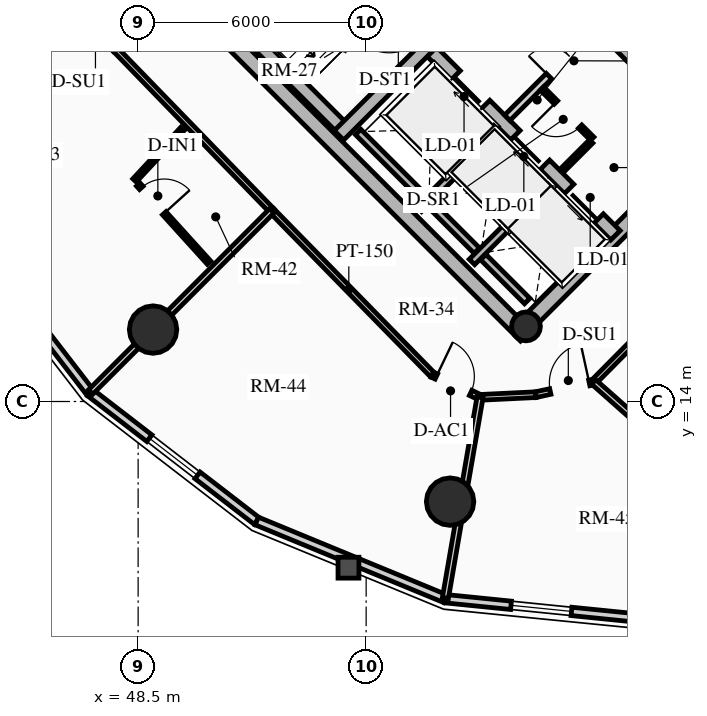
"""IFC4 building model, lengths in metres.
Left out: names, types, materials, properties, quantities, classifications, styles, units other than length and angle.
Written with IfcOpenShell. Run it as: python <this file> out.ifc"""

import sys

from ifc_helpers import new_model, si_unit, direction, frame, frame_2d, origin, origin_2d, place, context, subcontext, project, spatial, rectangle, circle, hollow_circle, extrude, source, transform, mapped, element, fill, save


model = new_model("IFC4")
c1 = context("Model", 3, precision=1e-05, world=origin(), true_north=direction((0.0, 1.0)))
c2 = subcontext(c1, "Body", "Model", "MODEL_VIEW")
j1 = project(units=[si_unit("LENGTHUNIT", "METRE"), si_unit("PLANEANGLEUNIT", "RADIAN")], contexts=[c1])
p1 = place(None, origin())
s1 = spatial("IfcSite", under=j1, at=p1, CompositionType="ELEMENT")
p2 = place(p1, origin())
s2 = spatial("IfcBuilding", under=s1, at=p2, CompositionType="ELEMENT")
p3 = place(p2, frame((0.0, 0.0, 154.51)))
s3 = spatial("IfcBuildingStorey", under=s2, at=p3, CompositionType="ELEMENT", Elevation=154.51)
for number, where, z_axis, x_axis in (
    (1, (58.702, 15.732, 0.0), (0.0, 0.0, 1.0), (-0.707, 0.707, 0.0)),
    (2, (66.268, 23.298, 0.0), (0.0, 0.0, 1.0), (-0.707, 0.707, 0.0)),
):
    element("IfcWall", number, at=place(p3, frame(where, z_axis=z_axis, x_axis=x_axis)), inside=s3, PredefinedType="SHEAR", context=c2, shape_type="SweptSolid", body=[
        extrude(rectangle(XDim=14.1, YDim=0.4, at=frame_2d((7.05, 0.0))), origin(), (0.0, 0.0, 1.0), 2.91),
    ])
p4 = place(p3, frame((58.561, 15.873, 0.0), z_axis=(0.0, 0.0, 1.0), x_axis=(0.707106781187, 0.707106781187, 0.0)))
e3 = element("IfcWall", 3, at=p4, inside=s3, PredefinedType="SHEAR", context=c2, shape_type="SweptSolid", body=[
    extrude(rectangle(XDim=10.7, YDim=0.4, at=frame_2d((5.35, 0.0))), origin(), (0.0, 0.0, 1.0), 2.91),
])
m1 = source(origin(), c2, "Body", "SweptSolid", [
    extrude(rectangle(XDim=1.5, YDim=2.02, at=frame_2d((0.75, 1.01))), frame((0.0, 0.21, 0.0), z_axis=(0.0, -1.0, 0.0), x_axis=(1.0, 0.0, 0.0)), (0.0, 0.0, 1.0), 0.42),
])
p5 = place(p4, frame((5.45, 0.0, 0.0)))
e4 = element("IfcOpeningElement", 4, at=p5, cuts=e3, PredefinedType="OPENING", context=c2, shape_type="MappedRepresentation", body=[
    mapped(m1, transform((0.0, 0.0, 0.0), x_axis=(1.0, 0.0, 0.0), y_axis=(0.0, 1.0, 0.0), z_axis=(0.0, 0.0, 1.0), scale=1.0)),
])
p6 = place(p3, frame((61.06, 18.373, 0.0), z_axis=(0.0, 0.0, 1.0), x_axis=(-0.707106781187, 0.707106781187, 0.0)))
e5 = element("IfcWall", 5, at=p6, inside=s3, PredefinedType="SHEAR", context=c2, shape_type="SweptSolid", body=[
    extrude(rectangle(XDim=13.7, YDim=0.35, at=frame_2d((6.85, 0.0))), origin(), (0.0, 0.0, 1.0), 2.91),
])
m2 = source(origin(), c2, "Body", "SweptSolid", [
    extrude(rectangle(XDim=1.1, YDim=2.015, at=frame_2d((0.55, 1.007))), frame((0.0, 0.185, 0.0), z_axis=(0.0, -1.0, 0.0), x_axis=(1.0, 0.0, 0.0)), (0.0, 0.0, 1.0), 0.37),
])
p7 = place(p6, frame((4.85, 0.0, 0.0)))
e6 = element("IfcOpeningElement", 6, at=p7, cuts=e5, PredefinedType="OPENING", context=c2, shape_type="MappedRepresentation", body=[
    mapped(m2, transform((0.0, 0.0, 0.0), x_axis=(1.0, 0.0, 0.0), y_axis=(0.0, 1.0, 0.0), z_axis=(0.0, 0.0, 1.0), scale=1.0)),
])
p8 = place(p6, frame((0.625, 0.0, 0.0)))
e7 = element("IfcOpeningElement", 7, at=p8, cuts=e5, PredefinedType="OPENING", context=c2, shape_type="MappedRepresentation", body=[
    mapped(m2, transform((0.0, 0.0, 0.0), x_axis=(1.0, 0.0, 0.0), y_axis=(0.0, 1.0, 0.0), z_axis=(0.0, 0.0, 1.0), scale=1.0)),
])
p9 = place(p6, frame((2.625, 0.0, 0.0)))
e8 = element("IfcOpeningElement", 8, at=p9, cuts=e5, PredefinedType="OPENING", context=c2, shape_type="MappedRepresentation", body=[
    mapped(m2, transform((0.0, 0.0, 0.0), x_axis=(1.0, 0.0, 0.0), y_axis=(0.0, 1.0, 0.0), z_axis=(0.0, 0.0, 1.0), scale=1.0)),
])
m3 = source(origin(), c2, "Body", "SweptSolid", [
    extrude(rectangle(XDim=1.15, YDim=2.02, at=frame_2d((0.575, 1.01))), frame((0.0, 0.185, 0.0), z_axis=(0.0, -1.0, 0.0), x_axis=(1.0, 0.0, 0.0)), (0.0, 0.0, 1.0), 0.37),
])
p10 = place(p6, frame((7.27, 0.0, 0.0)))
e9 = element("IfcOpeningElement", 9, at=p10, cuts=e5, PredefinedType="OPENING", context=c2, shape_type="MappedRepresentation", body=[
    mapped(m3, transform((0.0, 0.0, 0.0), x_axis=(1.0, 0.0, 0.0), y_axis=(0.0, 1.0, 0.0), z_axis=(0.0, 0.0, 1.0), scale=1.0)),
])
p11 = place(p3, frame((63.627, 20.94, 0.0), z_axis=(0.0, 0.0, 1.0), x_axis=(-0.707119496762, 0.707094065383, 0.0)))
e10 = element("IfcWall", 10, at=p11, inside=s3, PredefinedType="SHEAR", context=c2, shape_type="SweptSolid", body=[
    extrude(rectangle(XDim=9.6, YDim=0.35, at=frame_2d((4.8, 0.0))), origin(), (0.0, 0.0, 1.0), 2.91),
])
p12 = place(p11, frame((5.28, 0.0, 0.0)))
e11 = element("IfcOpeningElement", 11, at=p12, cuts=e10, PredefinedType="OPENING", context=c2, shape_type="MappedRepresentation", body=[
    mapped(m3, transform((0.0, 0.0, 0.0), x_axis=(1.0, 0.0, 0.0), y_axis=(0.0, 1.0, 0.0), z_axis=(0.0, 0.0, 1.0), scale=1.0)),
])
p13 = place(p3, frame((53.922, 21.141, 0.0), z_axis=(0.0, 0.0, 1.0), x_axis=(-0.707106781187, 0.707106781187, 0.0)))
e12 = element("IfcWall", 12, at=p13, inside=s3, PredefinedType="SHEAR", context=c2, shape_type="SweptSolid", body=[
    extrude(rectangle(XDim=6.695, YDim=0.35, at=frame_2d((3.348, 0.0))), origin(), (0.0, 0.0, 1.0), 2.91),
])
p14 = place(p3, frame((53.784, 21.003, 0.0), z_axis=(0.0, 0.0, 1.0), x_axis=(0.707106781187, 0.707106781187, 0.0)))
e13 = element("IfcWall", 13, at=p14, inside=s3, PredefinedType="SHEAR", context=c2, shape_type="SweptSolid", body=[
    extrude(rectangle(XDim=3.285, YDim=0.35, at=frame_2d((1.643, 0.0))), origin(), (0.0, 0.0, 1.0), 2.91),
])
p15 = place(p3, frame((65.812, 23.125, 0.0), z_axis=(0.0, 0.0, 1.0), x_axis=(-0.707106781187, 0.707106781187, 0.0)))
e14 = element("IfcWall", 14, at=p15, inside=s3, PredefinedType="SHEAR", context=c2, shape_type="SweptSolid", body=[
    extrude(rectangle(XDim=6.695, YDim=0.35, at=frame_2d((3.348, 0.0))), origin(), (0.0, 0.0, 1.0), 2.91),
])
p16 = place(p3, frame((58.706, 15.976, 0.0), z_axis=(0.0, 0.0, 1.0), x_axis=(0.707106781187, 0.707106781187, 0.0)))
e15 = element("IfcColumn", 15, at=p16, inside=s3, PredefinedType="COLUMN", context=c2, shape_type="SweptSolid", body=[
    extrude(hollow_circle(Radius=0.38, WallThickness=0.032, at=origin_2d()), origin(), (0.0, 0.0, 1.0), 2.91),
])
for number, where, z_axis, x_axis in (
    (16, (48.893, 15.893, 0.0), (0.0, 0.0, 1.0), (1.0, 0.0, 0.0)),
    (17, (56.709, 11.365, 0.0), (0.0, 0.0, 1.0), (1.0, 0.0, 0.0)),
):
    element("IfcColumn", number, at=place(p3, frame(where, z_axis=z_axis, x_axis=x_axis)), inside=s3, PredefinedType="USERDEFINED", context=c2, shape_type="SweptSolid", body=[
        extrude(circle(Radius=0.625, at=origin_2d()), origin(), (0.0, 0.0, 1.0), 2.91),
    ])
p17 = place(p3, frame((47.236, 14.236, 0.0), z_axis=(0.0, 0.0, 1.0), x_axis=(-0.610543584779, 0.791982658323, 0.0)))
e18 = element("IfcWall", 18, at=p17, inside=s3, PredefinedType="SOLIDWALL", context=c2, shape_type="SweptSolid", body=[
    extrude(rectangle(XDim=5.537, YDim=0.22, at=frame_2d((2.769, 0.0))), origin(), (0.0, 0.0, 1.0), 2.245),
])
p18 = place(p3, frame((51.622, 10.856, 0.0), z_axis=(0.0, 0.0, 1.0), x_axis=(-0.791982658323, 0.610543584779, 0.0)))
e19 = element("IfcWall", 19, at=p18, inside=s3, PredefinedType="SOLIDWALL", context=c2, shape_type="SweptSolid", body=[
    extrude(rectangle(XDim=5.537, YDim=0.22, at=frame_2d((2.769, 0.0))), origin(), (0.0, 0.0, 1.0), 2.245),
])
m4 = source(origin(), c2, "Body", "SweptSolid", [
    extrude(rectangle(XDim=1.6, YDim=1.3, at=frame_2d((0.8, 0.65))), frame((0.0, 0.12, 0.0), z_axis=(0.0, -1.0, 0.0), x_axis=(1.0, 0.0, 0.0)), (0.0, 0.0, 1.0), 0.24),
])
p19 = place(p18, frame((1.968, 0.0, 0.65)))
e20 = element("IfcOpeningElement", 20, at=p19, cuts=e19, PredefinedType="OPENING", context=c2, shape_type="MappedRepresentation", body=[
    mapped(m4, transform((0.0, 0.0, 0.0), x_axis=(1.0, 0.0, 0.0), y_axis=(0.0, 1.0, 0.0), z_axis=(0.0, 0.0, 1.0), scale=1.0)),
])
p20 = place(p3, frame((56.582, 8.811, 0.0), z_axis=(0.0, 0.0, 1.0), x_axis=(-0.924528197738, 0.38111364655, 0.0)))
e21 = element("IfcWall", 21, at=p20, inside=s3, PredefinedType="SOLIDWALL", context=c2, shape_type="SweptSolid", body=[
    extrude(rectangle(XDim=5.366, YDim=0.22, at=frame_2d((2.683, 0.0))), origin(), (0.0, 0.0, 1.0), 2.245),
])
p21 = place(p3, frame((61.633, 8.302, 0.0), z_axis=(0.0, 0.0, 1.0), x_axis=(-0.994959267396, 0.100279889424, 0.0)))
e22 = element("IfcWall", 22, at=p21, inside=s3, PredefinedType="SOLIDWALL", context=c2, shape_type="SweptSolid", body=[
    extrude(rectangle(XDim=5.076, YDim=0.22, at=frame_2d((2.538, 0.0))), origin(), (0.0, 0.0, 1.0), 2.245),
])
p22 = place(p21, frame((1.738, 0.0, 0.65)))
e23 = element("IfcOpeningElement", 23, at=p22, cuts=e22, PredefinedType="OPENING", context=c2, shape_type="MappedRepresentation", body=[
    mapped(m4, transform((0.0, 0.0, 0.0), x_axis=(1.0, 0.0, 0.0), y_axis=(0.0, 1.0, 0.0), z_axis=(0.0, 0.0, 1.0), scale=1.0)),
])
p23 = place(p3, frame((55.888, 19.069, 0.0), z_axis=(0.0, 0.0, 1.0), x_axis=(0.707106781187, 0.707106781187, 0.0)))
e24 = element("IfcWall", 24, at=p23, inside=s3, PredefinedType="SHEAR", context=c2, shape_type="SweptSolid", body=[
    extrude(rectangle(XDim=2.97, YDim=0.2, at=frame_2d((1.485, 0.0))), origin(), (0.0, 0.0, 1.0), 2.91),
])
p24 = place(p3, frame((56.015, 19.366, 0.0), z_axis=(0.0, 0.0, 1.0), x_axis=(-0.707106781187, 0.707106781187, 0.0)))
e25 = element("IfcWall", 25, at=p24, inside=s3, PredefinedType="SHEAR", context=c2, shape_type="SweptSolid", body=[
    extrude(rectangle(XDim=2.44, YDim=0.2, at=frame_2d((1.22, 0.0))), origin(), (0.0, 0.0, 1.0), 2.91),
])
p25 = place(p3, frame((57.284, 17.673, 0.0), z_axis=(0.0, 0.0, 1.0), x_axis=(0.707147878904, 0.70706568108, 0.0)))
e26 = element("IfcWall", 26, at=p25, inside=s3, PredefinedType="SHEAR", context=c2, shape_type="SweptSolid", body=[
    extrude(rectangle(XDim=2.97, YDim=0.2, at=frame_2d((1.485, 0.0))), origin(), (0.0, 0.0, 1.0), 2.91),
])
p26 = place(p3, frame((57.412, 17.97, 0.0), z_axis=(0.0, 0.0, 1.0), x_axis=(-0.707106781187, 0.707106781187, 0.0)))
e27 = element("IfcWall", 27, at=p26, inside=s3, PredefinedType="SHEAR", context=c2, shape_type="SweptSolid", body=[
    extrude(rectangle(XDim=1.735, YDim=0.2, at=frame_2d((0.867, 0.0))), origin(), (0.0, 0.0, 1.0), 2.91),
])
p27 = place(p3, frame((58.737, 16.644, 0.0), z_axis=(0.0, 0.0, 1.0), x_axis=(-0.707032117043, 0.707181437447, 0.0)))
e28 = element("IfcWall", 28, at=p27, inside=s3, PredefinedType="SHEAR", context=c2, shape_type="SweptSolid", body=[
    extrude(rectangle(XDim=1.635, YDim=0.2, at=frame_2d((0.817, 0.0))), origin(), (0.0, 0.0, 1.0), 2.91),
])
p28 = place(p3, frame((58.214, 21.467, 0.0), z_axis=(0.0, 0.0, 1.0), x_axis=(0.707106781187, 0.707106781187, 0.0)))
e29 = element("IfcWall", 29, at=p28, inside=s3, PredefinedType="PARTITIONING", context=c2, shape_type="SweptSolid", body=[
    extrude(rectangle(XDim=3.28, YDim=0.2, at=frame_2d((1.64, 0.0))), origin(), (0.0, 0.0, 1.0), 2.675),
])
m5 = source(origin(), c2, "Body", "SweptSolid", [
    extrude(rectangle(XDim=1.5, YDim=2.02, at=frame_2d((0.75, 1.01))), frame((0.0, 0.11, 0.0), z_axis=(0.0, -1.0, 0.0), x_axis=(1.0, 0.0, 0.0)), (0.0, 0.0, 1.0), 0.22),
])
p29 = place(p28, frame((1.55, 0.0, 0.0)))
e30 = element("IfcOpeningElement", 30, at=p29, cuts=e29, PredefinedType="OPENING", context=c2, shape_type="MappedRepresentation", body=[
    mapped(m5, transform((0.0, 0.0, 0.0), x_axis=(1.0, 0.0, 0.0), y_axis=(0.0, 1.0, 0.0), z_axis=(0.0, 0.0, 1.0), scale=1.0)),
])
p30 = place(p3, frame((60.448, 20.915, 0.0), z_axis=(0.0, 0.0, 1.0), x_axis=(-0.707106781187, 0.707106781187, 0.0)))
e31 = element("IfcWall", 31, at=p30, inside=s3, PredefinedType="PARTITIONING", context=c2, shape_type="SweptSolid", body=[
    extrude(rectangle(XDim=1.87, YDim=0.125, at=frame_2d((0.935, 0.0))), origin(), (0.0, 0.0, 1.0), 2.675),
])
m6 = source(origin(), c2, "Body", "SweptSolid", [
    extrude(rectangle(XDim=0.9, YDim=2.005, at=frame_2d((0.45, 1.002))), frame((0.0, 0.073, 0.0), z_axis=(0.0, -1.0, 0.0), x_axis=(1.0, 0.0, 0.0)), (0.0, 0.0, 1.0), 0.145),
])
p31 = place(p30, frame((0.45, 0.0, 0.0)))
e32 = element("IfcOpeningElement", 32, at=p31, cuts=e31, PredefinedType="OPENING", context=c2, shape_type="MappedRepresentation", body=[
    mapped(m6, transform((0.0, 0.0, 0.0), x_axis=(1.0, 0.0, 0.0), y_axis=(0.0, 1.0, 0.0), z_axis=(0.0, 0.0, 1.0), scale=1.0)),
])
p32 = place(p3, frame((59.643, 20.066, 0.0), z_axis=(0.0, 0.0, 1.0), x_axis=(0.707106781187, 0.707106781187, 0.0)))
e33 = element("IfcWall", 33, at=p32, inside=s3, PredefinedType="PARTITIONING", context=c2, shape_type="SweptSolid", body=[
    extrude(rectangle(XDim=1.1, YDim=0.125, at=frame_2d((0.55, 0.0))), origin(), (0.0, 0.0, 1.0), 2.675),
])
p33 = place(p3, frame((47.901, 23.265, 0.0), z_axis=(0.0, 0.0, 1.0), x_axis=(0.696355965374, -0.717696572019, 0.0)))
e34 = element("IfcWall", 34, at=p33, inside=s3, PredefinedType="PARTITIONING", context=c2, shape_type="SweptSolid", body=[
    extrude(rectangle(XDim=5.915, YDim=0.15, at=frame_2d((2.957, 0.0))), origin(), (0.0, 0.0, 1.0), 2.675),
])
p34 = place(p3, frame((52.02, 19.02, 0.0), z_axis=(0.0, 0.0, 1.0), x_axis=(0.699456449804, -0.71467522332, 0.0)))
e35 = element("IfcWall", 35, at=p34, inside=s3, PredefinedType="PARTITIONING", context=c2, shape_type="SweptSolid", body=[
    extrude(rectangle(XDim=6.032, YDim=0.15, at=frame_2d((3.016, 0.0))), origin(), (0.0, 0.0, 1.0), 2.245),
])
p35 = place(p3, frame((56.239, 14.709, 0.0), z_axis=(0.0, 0.0, 1.0), x_axis=(0.902374219125, -0.430953325383, 0.0)))
e36 = element("IfcWall", 36, at=p35, inside=s3, PredefinedType="PARTITIONING", context=c2, shape_type="SweptSolid", body=[
    extrude(rectangle(XDim=1.394, YDim=0.15, at=frame_2d((0.697, 0.0))), origin(), (0.0, 0.0, 1.0), 2.245),
])
m7 = source(origin(), c2, "Body", "SweptSolid", [
    extrude(rectangle(XDim=1.0, YDim=2.015, at=frame_2d((0.5, 1.007))), frame((0.0, 0.085, 0.0), z_axis=(0.0, -1.0, 0.0), x_axis=(1.0, 0.0, 0.0)), (0.0, 0.0, 1.0), 0.17),
])
p36 = place(p35, frame((0.12, 0.0, 0.0)))
e37 = element("IfcOpeningElement", 37, at=p36, cuts=e36, PredefinedType="OPENING", context=c2, shape_type="MappedRepresentation", body=[
    mapped(m7, transform((0.0, 0.0, 0.0), x_axis=(1.0, 0.0, 0.0), y_axis=(0.0, 1.0, 0.0), z_axis=(0.0, 0.0, 1.0), scale=1.0)),
])
p37 = place(p3, frame((57.497, 14.109, 0.0), z_axis=(0.0, 0.0, 1.0), x_axis=(0.998828286318, 0.048394777109, 0.0)))
e38 = element("IfcWall", 38, at=p37, inside=s3, PredefinedType="PARTITIONING", context=c2, shape_type="SweptSolid", body=[
    extrude(rectangle(XDim=1.468, YDim=0.15, at=frame_2d((0.734, 0.0))), origin(), (0.0, 0.0, 1.0), 2.245),
])
p38 = place(p3, frame((58.963, 14.18, 0.0), z_axis=(0.0, 0.0, 1.0), x_axis=(0.976826524015, 0.214032572243, 0.0)))
e39 = element("IfcWall", 39, at=p38, inside=s3, PredefinedType="PARTITIONING", context=c2, shape_type="SweptSolid", body=[
    extrude(rectangle(XDim=1.562, YDim=0.15, at=frame_2d((0.781, 0.0))), origin(), (0.0, 0.0, 1.0), 2.245),
])
m8 = source(origin(), c2, "Body", "SweptSolid", [
    extrude(rectangle(XDim=1.05, YDim=2.015, at=frame_2d((0.525, 1.007))), frame((0.0, 0.085, 0.0), z_axis=(0.0, -1.0, 0.0), x_axis=(1.0, 0.0, 0.0)), (0.0, 0.0, 1.0), 0.17),
])
p39 = place(p38, frame((0.392, 0.0, 0.0)))
e40 = element("IfcOpeningElement", 40, at=p39, cuts=e39, PredefinedType="OPENING", context=c2, shape_type="MappedRepresentation", body=[
    mapped(m8, transform((0.0, 0.0, 0.0), x_axis=(1.0, 0.0, 0.0), y_axis=(0.0, 1.0, 0.0), z_axis=(0.0, 0.0, 1.0), scale=1.0)),
])
p40 = place(p3, frame((60.488, 14.514, 0.0), z_axis=(0.0, 0.0, 1.0), x_axis=(0.703880260405, 0.71031864611, 0.0)))
e41 = element("IfcWall", 41, at=p40, inside=s3, PredefinedType="PARTITIONING", context=c2, shape_type="SweptSolid", body=[
    extrude(rectangle(XDim=3.261, YDim=0.15, at=frame_2d((1.63, 0.0))), origin(), (0.0, 0.0, 1.0), 2.245),
])
p41 = place(p3, frame((52.02, 19.02, 0.0), z_axis=(0.0, 0.0, 1.0), x_axis=(-0.707106781187, -0.707106781187, 0.0)))
e42 = element("IfcWall", 42, at=p41, inside=s3, PredefinedType="PARTITIONING", context=c2, shape_type="SweptSolid", body=[
    extrude(rectangle(XDim=6.745, YDim=0.16, at=frame_2d((3.373, 0.0))), origin(), (0.0, 0.0, 1.0), 2.245),
])
p42 = place(p3, frame((57.497, 14.109, 0.0), z_axis=(0.0, 0.0, 1.0), x_axis=(-0.170109923992, -0.985425092922, 0.0)))
e43 = element("IfcWall", 43, at=p42, inside=s3, PredefinedType="PARTITIONING", context=c2, shape_type="SweptSolid", body=[
    extrude(rectangle(XDim=5.356, YDim=0.16, at=frame_2d((2.678, 0.0))), origin(), (0.0, 0.0, 1.0), 2.245),
])
p43 = place(p3, frame((60.488, 14.514, 0.0), z_axis=(0.0, 0.0, 1.0), x_axis=(0.748740614849, -0.662863101761, 0.0)))
e44 = element("IfcWall", 44, at=p43, inside=s3, PredefinedType="PARTITIONING", context=c2, shape_type="SweptSolid", body=[
    extrude(rectangle(XDim=7.721, YDim=0.16, at=frame_2d((3.861, 0.0))), origin(), (0.0, 0.0, 1.0), 2.245),
])
p44 = place(p3, frame((49.665, 21.171, 0.0), z_axis=(0.0, 0.0, 1.0), x_axis=(-0.681089123144, -0.73220052331, 0.0)))
e45 = element("IfcWall", 45, at=p44, inside=s3, PredefinedType="PARTITIONING", context=c2, shape_type="SweptSolid", body=[
    extrude(rectangle(XDim=1.849, YDim=0.125, at=frame_2d((0.924, 0.0))), origin(), (0.0, 0.0, 1.0), 2.675),
])
p45 = place(p3, frame((48.503, 19.711, 0.0), z_axis=(0.0, 0.0, 1.0), x_axis=(0.671201050003, -0.741275354018, 0.0)))
e46 = element("IfcWall", 46, at=p45, inside=s3, PredefinedType="PARTITIONING", context=c2, shape_type="SweptSolid", body=[
    extrude(rectangle(XDim=2.777, YDim=0.125, at=frame_2d((1.388, 0.0))), origin(), (0.0, 0.0, 1.0), 2.675),
])
p46 = place(p45, frame((0.12, 0.0, 0.0)))
e47 = element("IfcOpeningElement", 47, at=p46, cuts=e46, PredefinedType="OPENING", context=c2, shape_type="MappedRepresentation", body=[
    mapped(m6, transform((0.0, 0.0, 0.0), x_axis=(1.0, 0.0, 0.0), y_axis=(0.0, 1.0, 0.0), z_axis=(0.0, 0.0, 1.0), scale=1.0)),
])
m9 = source(origin(), c2, "Body", "SweptSolid", [
    extrude(rectangle(XDim=1.6, YDim=1.3, at=frame_2d((0.8, 0.65))), frame((0.0, 0.03, 0.0), z_axis=(0.0, -1.0, 0.0), x_axis=(1.0, 0.0, 0.0)), (0.0, 0.0, 1.0), 0.06),
])
p47 = place(p19, origin())
e48 = element("IfcWindow", 48, at=p47, inside=s3, PartitioningType="SINGLE_PANEL", PredefinedType="WINDOW", context=c2, shape_type="MappedRepresentation", body=[
    mapped(m9, transform((0.0, 0.0, 0.0), x_axis=(1.0, 0.0, 0.0), y_axis=(0.0, 1.0, 0.0), z_axis=(0.0, 0.0, 1.0), scale=1.0)),
])
fill(e20, e48)
p48 = place(p22, origin())
e49 = element("IfcWindow", 49, at=p48, inside=s3, PartitioningType="SINGLE_PANEL", PredefinedType="WINDOW", context=c2, shape_type="MappedRepresentation", body=[
    mapped(m9, transform((0.0, 0.0, 0.0), x_axis=(1.0, 0.0, 0.0), y_axis=(0.0, 1.0, 0.0), z_axis=(0.0, 0.0, 1.0), scale=1.0)),
])
fill(e23, e49)
m10 = source(origin(), c2, "Body", "SweptSolid", [
    extrude(rectangle(XDim=1.1, YDim=2.015, at=frame_2d((0.55, 1.007))), frame((0.0, 0.025, 0.0), z_axis=(0.0, -1.0, 0.0), x_axis=(1.0, 0.0, 0.0)), (0.0, 0.0, 1.0), 0.05),
])
p49 = place(p7, origin())
e50 = element("IfcDoor", 50, at=p49, inside=s3, OperationType="SLIDING_TO_RIGHT", PredefinedType="DOOR", context=c2, shape_type="MappedRepresentation", body=[
    mapped(m10, transform((0.0, 0.0, 0.0), x_axis=(1.0, 0.0, 0.0), y_axis=(0.0, 1.0, 0.0), z_axis=(0.0, 0.0, 1.0), scale=1.0)),
])
fill(e6, e50)
p50 = place(p8, origin())
e51 = element("IfcDoor", 51, at=p50, inside=s3, OperationType="SLIDING_TO_LEFT", PredefinedType="DOOR", context=c2, shape_type="MappedRepresentation", body=[
    mapped(m10, transform((0.0, 0.0, 0.0), x_axis=(1.0, 0.0, 0.0), y_axis=(0.0, 1.0, 0.0), z_axis=(0.0, 0.0, 1.0), scale=1.0)),
])
fill(e7, e51)
p51 = place(p9, origin())
e52 = element("IfcDoor", 52, at=p51, inside=s3, OperationType="SLIDING_TO_RIGHT", PredefinedType="DOOR", context=c2, shape_type="MappedRepresentation", body=[
    mapped(m10, transform((0.0, 0.0, 0.0), x_axis=(1.0, 0.0, 0.0), y_axis=(0.0, 1.0, 0.0), z_axis=(0.0, 0.0, 1.0), scale=1.0)),
])
fill(e8, e52)
m11 = source(origin(), c2, "Body", "SweptSolid", [
    extrude(rectangle(XDim=1.5, YDim=2.02, at=frame_2d((0.75, 1.01))), frame((0.0, 0.025, 0.0), z_axis=(0.0, -1.0, 0.0), x_axis=(1.0, 0.0, 0.0)), (0.0, 0.0, 1.0), 0.05),
])
p52 = place(p29, origin())
e53 = element("IfcDoor", 53, at=p52, inside=s3, OperationType="DOUBLE_DOOR_SINGLE_SWING", PredefinedType="DOOR", context=c2, shape_type="MappedRepresentation", body=[
    mapped(m11, transform((0.0, 0.0, 0.0), x_axis=(1.0, 0.0, 0.0), y_axis=(0.0, 1.0, 0.0), z_axis=(0.0, 0.0, 1.0), scale=1.0)),
])
fill(e30, e53)
m12 = source(origin(), c2, "Body", "SweptSolid", [
    extrude(rectangle(XDim=0.9, YDim=2.005, at=frame_2d((0.45, 1.002))), frame((0.0, 0.025, 0.0), z_axis=(0.0, -1.0, 0.0), x_axis=(1.0, 0.0, 0.0)), (0.0, 0.0, 1.0), 0.05),
])
p53 = place(p31, origin())
e54 = element("IfcDoor", 54, at=p53, inside=s3, OperationType="SINGLE_SWING_RIGHT", PredefinedType="DOOR", context=c2, shape_type="MappedRepresentation", body=[
    mapped(m12, transform((0.0, 0.0, 0.0), x_axis=(1.0, 0.0, 0.0), y_axis=(0.0, 1.0, 0.0), z_axis=(0.0, 0.0, 1.0), scale=1.0)),
])
fill(e32, e54)
p54 = place(p46, origin())
e55 = element("IfcDoor", 55, at=p54, inside=s3, OperationType="SINGLE_SWING_RIGHT", PredefinedType="DOOR", context=c2, shape_type="MappedRepresentation", body=[
    mapped(m12, transform((0.0, 0.0, 0.0), x_axis=(1.0, 0.0, 0.0), y_axis=(0.0, 1.0, 0.0), z_axis=(0.0, 0.0, 1.0), scale=1.0)),
])
fill(e47, e55)
m13 = source(origin(), c2, "Body", "SweptSolid", [
    extrude(rectangle(XDim=1.0, YDim=2.015, at=frame_2d((0.5, 1.007))), frame((0.0, 0.025, 0.0), z_axis=(0.0, -1.0, 0.0), x_axis=(1.0, 0.0, 0.0)), (0.0, 0.0, 1.0), 0.05),
])
p55 = place(p36, origin())
e56 = element("IfcDoor", 56, at=p55, inside=s3, OperationType="SINGLE_SWING_LEFT", PredefinedType="DOOR", context=c2, shape_type="MappedRepresentation", body=[
    mapped(m13, transform((0.0, 0.0, 0.0), x_axis=(1.0, 0.0, 0.0), y_axis=(0.0, 1.0, 0.0), z_axis=(0.0, 0.0, 1.0), scale=1.0)),
])
fill(e37, e56)
m14 = source(origin(), c2, "Body", "SweptSolid", [
    extrude(rectangle(XDim=1.05, YDim=2.015, at=frame_2d((0.525, 1.007))), frame((0.0, 0.025, 0.0), z_axis=(0.0, -1.0, 0.0), x_axis=(1.0, 0.0, 0.0)), (0.0, 0.0, 1.0), 0.05),
])
p56 = place(p39, origin())
e57 = element("IfcDoor", 57, at=p56, inside=s3, OperationType="SINGLE_SWING_RIGHT", PredefinedType="DOOR", context=c2, shape_type="MappedRepresentation", body=[
    mapped(m14, transform((0.0, 0.0, 0.0), x_axis=(1.0, 0.0, 0.0), y_axis=(0.0, 1.0, 0.0), z_axis=(0.0, 0.0, 1.0), scale=1.0)),
])
fill(e40, e57)
save(model, sys.argv[1])
